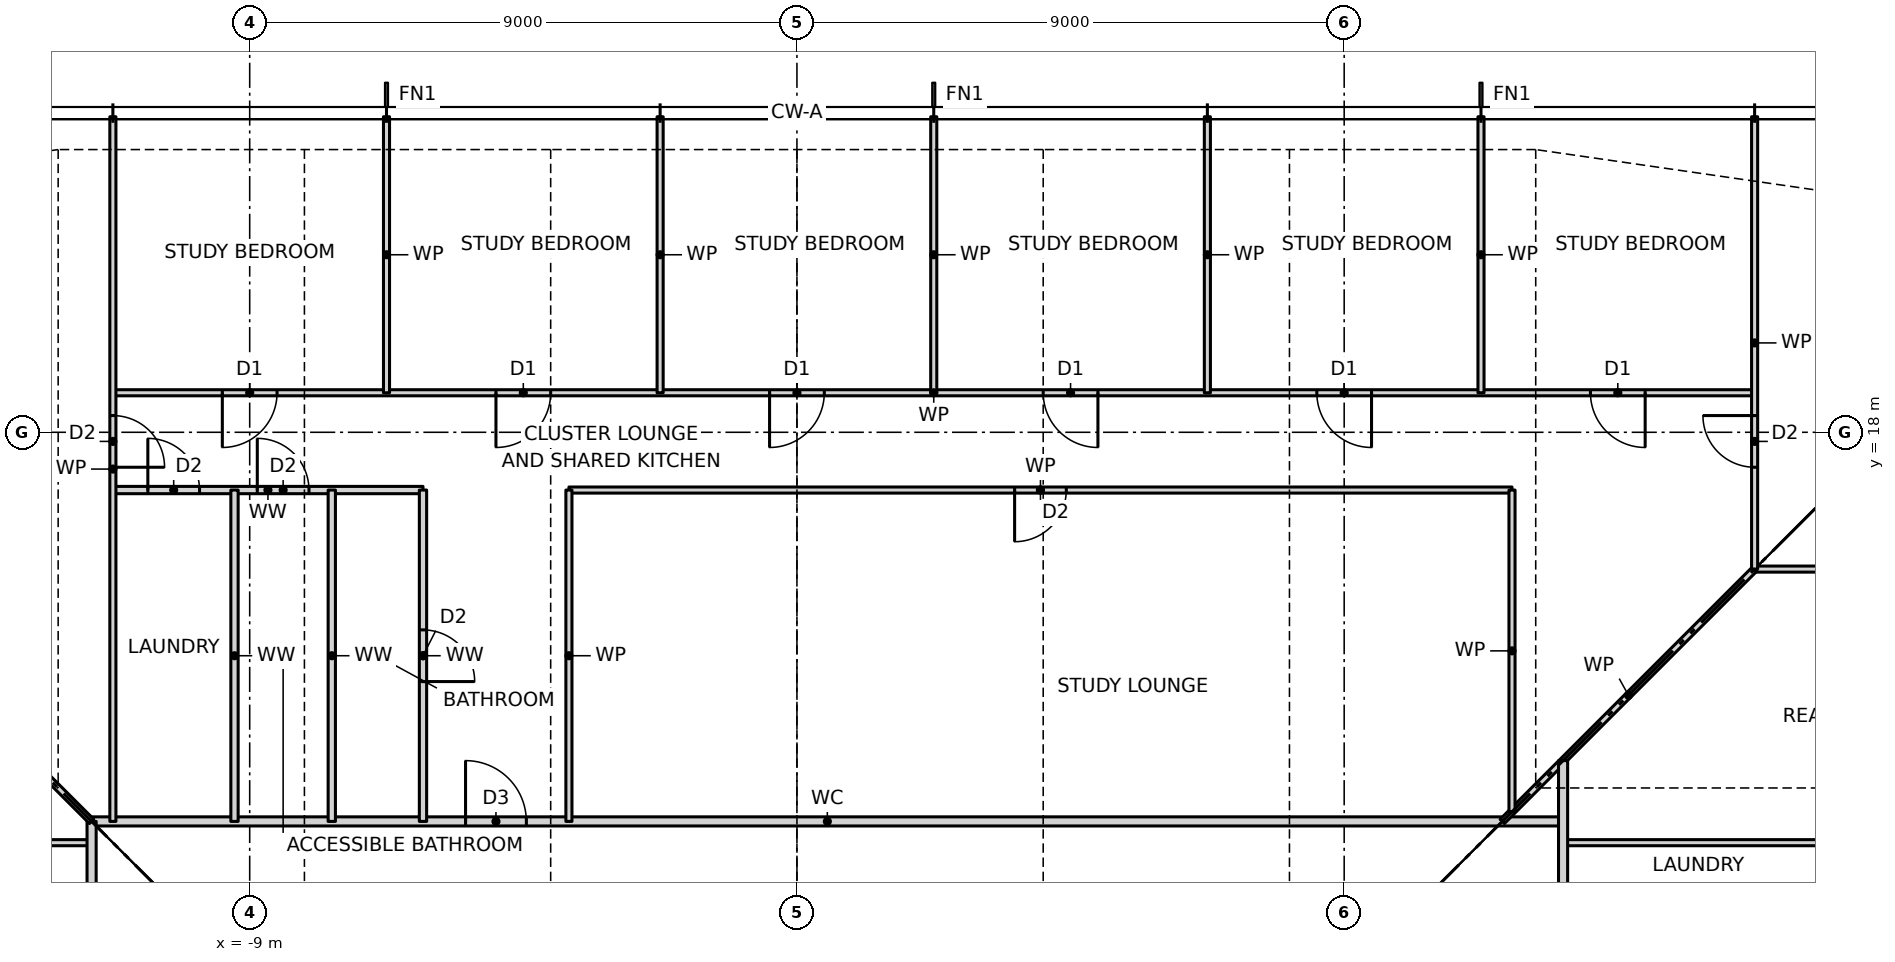
"""IFC4 building model, lengths in metres.
Left out: names, types, materials, properties, quantities, classifications, styles, units other than length and angle.
Written with IfcOpenShell. Run it as: python <this file> out.ifc"""

import sys

from ifc_helpers import new_model, si_unit, direction, frame, frame_2d, origin, place, context, subcontext, project, spatial, rectangle, extrude, element, fill, save


model = new_model("IFC4")
c1 = context("Model", 3, precision=1e-05, world=origin(), true_north=direction((0.0, 1.0)))
c2 = subcontext(c1, "Body", "Model", "MODEL_VIEW")
j1 = project(units=[si_unit("LENGTHUNIT", "METRE"), si_unit("PLANEANGLEUNIT", "RADIAN")], contexts=[c1])
p1 = place(None, origin())
s1 = spatial("IfcSite", under=j1, at=p1, CompositionType="ELEMENT")
p2 = place(p1, origin())
s2 = spatial("IfcBuilding", under=s1, at=p2, CompositionType="ELEMENT")
p3 = place(p2, frame((0.0, 0.0, 71.0)))
s3 = spatial("IfcBuildingStorey", under=s2, at=p3, CompositionType="ELEMENT", Elevation=71.0)
p4 = place(p3, frame((-23.19, 11.25, 0.0), z_axis=(0.0, 0.0, 1.0), x_axis=(1.0, 0.0, 0.0)))
e1 = element("IfcWall", 1, at=p4, inside=s3, PredefinedType="PARTITIONING", context=c2, shape_type="SweptSolid", body=[
    extrude(rectangle(XDim=11.59, YDim=0.1, at=frame_2d((5.795, 0.0))), origin(), (0.0, 0.0, 1.0), 3.2),
])
p5 = place(p4, frame((7.965, 0.0, 0.0)))
e2 = element("IfcOpeningElement", 2, at=p5, cuts=e1, PredefinedType="OPENING", context=c2, shape_type="SweptSolid", body=[
    extrude(rectangle(XDim=1.8, YDim=2.1, at=frame_2d((0.9, 1.05))), frame((0.0, 0.06, 0.0), z_axis=(0.0, -1.0, 0.0), x_axis=(1.0, 0.0, 0.0)), (0.0, 0.0, 1.0), 0.12),
])
p6 = place(p3, frame((12.6, 11.25, 0.0), z_axis=(0.0, 0.0, 1.0), x_axis=(1.0, 0.0, 0.0)))
e3 = element("IfcWall", 3, at=p6, inside=s3, PredefinedType="PARTITIONING", context=c2, shape_type="SweptSolid", body=[
    extrude(rectangle(XDim=10.59, YDim=0.1, at=frame_2d((5.295, 0.0))), origin(), (0.0, 0.0, 1.0), 3.2),
])
p7 = place(p6, frame((4.825, 0.0, 0.0)))
e4 = element("IfcOpeningElement", 4, at=p7, cuts=e3, PredefinedType="OPENING", context=c2, shape_type="SweptSolid", body=[
    extrude(rectangle(XDim=0.85, YDim=2.1, at=frame_2d((0.425, 1.05))), frame((0.0, 0.06, 0.0), z_axis=(0.0, -1.0, 0.0), x_axis=(1.0, 0.0, 0.0)), (0.0, 0.0, 1.0), 0.12),
])
p8 = place(p3, frame((-11.6, 11.6, 0.0), z_axis=(0.0, 0.0, 1.0), x_axis=(1.0, 0.0, 0.0)))
e5 = element("IfcWall", 5, at=p8, inside=s3, PredefinedType="PARTITIONING", context=c2, shape_type="SweptSolid", body=[
    extrude(rectangle(XDim=24.2, YDim=0.15, at=frame_2d((12.1, 0.0))), origin(), (0.0, 0.0, 1.0), 3.2),
])
p9 = place(p8, frame((6.15, 0.0, 0.0)))
e6 = element("IfcOpeningElement", 6, at=p9, cuts=e5, PredefinedType="OPENING", context=c2, shape_type="SweptSolid", body=[
    extrude(rectangle(XDim=1.0, YDim=2.1, at=frame_2d((0.5, 1.05))), frame((0.0, 0.085, 0.0), z_axis=(0.0, -1.0, 0.0), x_axis=(1.0, 0.0, 0.0)), (0.0, 0.0, 1.0), 0.17),
])
p10 = place(p3, frame((15.75, 15.75, 0.0), z_axis=(0.0, 0.0, 1.0), x_axis=(1.0, 0.0, 0.0)))
e7 = element("IfcWall", 7, at=p10, inside=s3, PredefinedType="PARTITIONING", context=c2, shape_type="SweptSolid", body=[
    extrude(rectangle(XDim=7.44, YDim=0.1, at=frame_2d((3.72, 0.0))), origin(), (0.0, 0.0, 1.0), 3.2),
])
p11 = place(p3, frame((-11.25, 17.05, 0.0), z_axis=(0.0, 0.0, 1.0), x_axis=(1.0, 0.0, 0.0)))
e8 = element("IfcWall", 8, at=p11, inside=s3, PredefinedType="PARTITIONING", context=c2, shape_type="SweptSolid", body=[
    extrude(rectangle(XDim=5.1, YDim=0.12, at=frame_2d((2.55, 0.0))), origin(), (0.0, 0.0, 1.0), 3.2),
])
p12 = place(p11, frame((2.375, 0.0, 0.0)))
e9 = element("IfcOpeningElement", 9, at=p12, cuts=e8, PredefinedType="OPENING", context=c2, shape_type="SweptSolid", body=[
    extrude(rectangle(XDim=0.85, YDim=2.1, at=frame_2d((0.425, 1.05))), frame((0.0, 0.07, 0.0), z_axis=(0.0, -1.0, 0.0), x_axis=(1.0, 0.0, 0.0)), (0.0, 0.0, 1.0), 0.14),
])
p13 = place(p11, frame((0.575, 0.0, 0.0)))
e10 = element("IfcOpeningElement", 10, at=p13, cuts=e8, PredefinedType="OPENING", context=c2, shape_type="SweptSolid", body=[
    extrude(rectangle(XDim=0.85, YDim=2.1, at=frame_2d((0.425, 1.05))), frame((0.0, 0.07, 0.0), z_axis=(0.0, -1.0, 0.0), x_axis=(1.0, 0.0, 0.0)), (0.0, 0.0, 1.0), 0.14),
])
p14 = place(p3, frame((-3.75, 17.05, 0.0), z_axis=(0.0, 0.0, 1.0), x_axis=(1.0, 0.0, 0.0)))
e11 = element("IfcWall", 11, at=p14, inside=s3, PredefinedType="PARTITIONING", context=c2, shape_type="SweptSolid", body=[
    extrude(rectangle(XDim=15.51, YDim=0.1, at=frame_2d((7.755, 0.0))), origin(), (0.0, 0.0, 1.0), 3.2),
])
p15 = place(p14, frame((7.33, 0.0, 0.0)))
e12 = element("IfcOpeningElement", 12, at=p15, cuts=e11, PredefinedType="OPENING", context=c2, shape_type="SweptSolid", body=[
    extrude(rectangle(XDim=0.85, YDim=2.1, at=frame_2d((0.425, 1.05))), frame((0.0, 0.06, 0.0), z_axis=(0.0, -1.0, 0.0), x_axis=(1.0, 0.0, 0.0)), (0.0, 0.0, 1.0), 0.12),
])
p16 = place(p3, frame((-11.25, 18.65, 0.0), z_axis=(0.0, 0.0, 1.0), x_axis=(1.0, 0.0, 0.0)))
e13 = element("IfcWall", 13, at=p16, inside=s3, PredefinedType="PARTITIONING", context=c2, shape_type="SweptSolid", body=[
    extrude(rectangle(XDim=27.0, YDim=0.1, at=frame_2d((13.5, 0.0))), origin(), (0.0, 0.0, 1.0), 3.2),
])
p17 = place(p16, frame((24.3, 0.0, 0.0)))
e14 = element("IfcOpeningElement", 14, at=p17, cuts=e13, PredefinedType="OPENING", context=c2, shape_type="SweptSolid", body=[
    extrude(rectangle(XDim=0.9, YDim=2.1, at=frame_2d((0.45, 1.05))), frame((0.0, 0.06, 0.0), z_axis=(0.0, -1.0, 0.0), x_axis=(1.0, 0.0, 0.0)), (0.0, 0.0, 1.0), 0.12),
])
p18 = place(p16, frame((19.8, 0.0, 0.0)))
e15 = element("IfcOpeningElement", 15, at=p18, cuts=e13, PredefinedType="OPENING", context=c2, shape_type="SweptSolid", body=[
    extrude(rectangle(XDim=0.9, YDim=2.1, at=frame_2d((0.45, 1.05))), frame((0.0, 0.06, 0.0), z_axis=(0.0, -1.0, 0.0), x_axis=(1.0, 0.0, 0.0)), (0.0, 0.0, 1.0), 0.12),
])
p19 = place(p16, frame((15.3, 0.0, 0.0)))
e16 = element("IfcOpeningElement", 16, at=p19, cuts=e13, PredefinedType="OPENING", context=c2, shape_type="SweptSolid", body=[
    extrude(rectangle(XDim=0.9, YDim=2.1, at=frame_2d((0.45, 1.05))), frame((0.0, 0.06, 0.0), z_axis=(0.0, -1.0, 0.0), x_axis=(1.0, 0.0, 0.0)), (0.0, 0.0, 1.0), 0.12),
])
p20 = place(p16, frame((10.8, 0.0, 0.0)))
e17 = element("IfcOpeningElement", 17, at=p20, cuts=e13, PredefinedType="OPENING", context=c2, shape_type="SweptSolid", body=[
    extrude(rectangle(XDim=0.9, YDim=2.1, at=frame_2d((0.45, 1.05))), frame((0.0, 0.06, 0.0), z_axis=(0.0, -1.0, 0.0), x_axis=(1.0, 0.0, 0.0)), (0.0, 0.0, 1.0), 0.12),
])
p21 = place(p16, frame((6.3, 0.0, 0.0)))
e18 = element("IfcOpeningElement", 18, at=p21, cuts=e13, PredefinedType="OPENING", context=c2, shape_type="SweptSolid", body=[
    extrude(rectangle(XDim=0.9, YDim=2.1, at=frame_2d((0.45, 1.05))), frame((0.0, 0.06, 0.0), z_axis=(0.0, -1.0, 0.0), x_axis=(1.0, 0.0, 0.0)), (0.0, 0.0, 1.0), 0.12),
])
p22 = place(p16, frame((1.8, 0.0, 0.0)))
e19 = element("IfcOpeningElement", 19, at=p22, cuts=e13, PredefinedType="OPENING", context=c2, shape_type="SweptSolid", body=[
    extrude(rectangle(XDim=0.9, YDim=2.1, at=frame_2d((0.45, 1.05))), frame((0.0, 0.06, 0.0), z_axis=(0.0, -1.0, 0.0), x_axis=(1.0, 0.0, 0.0)), (0.0, 0.0, 1.0), 0.12),
])
p23 = place(p3, frame((11.6, 11.6, 0.0), z_axis=(0.0, 0.0, 1.0), x_axis=(0.707106781187, 0.707106781187, 0.0)))
e20 = element("IfcWall", 20, at=p23, inside=s3, PredefinedType="PARTITIONING", context=c2, shape_type="SweptSolid", body=[
    extrude(rectangle(XDim=5.869, YDim=0.1, at=frame_2d((2.935, 0.0))), origin(), (0.0, 0.0, 1.0), 3.2),
])
p24 = place(p3, frame((15.75, 15.75, 0.0), z_axis=(0.0, 0.0, 1.0), x_axis=(0.0, 1.0, 0.0)))
e21 = element("IfcWall", 21, at=p24, inside=s3, PredefinedType="PARTITIONING", context=c2, shape_type="SweptSolid", body=[
    extrude(rectangle(XDim=7.44, YDim=0.1, at=frame_2d((3.72, 0.0))), origin(), (0.0, 0.0, 1.0), 3.2),
])
p25 = place(p24, frame((1.675, 0.0, 0.0)))
e22 = element("IfcOpeningElement", 22, at=p25, cuts=e21, PredefinedType="OPENING", context=c2, shape_type="SweptSolid", body=[
    extrude(rectangle(XDim=0.85, YDim=2.1, at=frame_2d((0.425, 1.05))), frame((0.0, 0.06, 0.0), z_axis=(0.0, -1.0, 0.0), x_axis=(1.0, 0.0, 0.0)), (0.0, 0.0, 1.0), 0.12),
])
p26 = place(p3, frame((12.6, -12.6, 0.0), z_axis=(0.0, 0.0, 1.0), x_axis=(0.0, 1.0, 0.0)))
e23 = element("IfcWall", 23, at=p26, inside=s3, PredefinedType="PARTITIONING", context=c2, shape_type="SweptSolid", body=[
    extrude(rectangle(XDim=25.2, YDim=0.15, at=frame_2d((12.6, 0.0))), origin(), (0.0, 0.0, 1.0), 3.2),
])
p27 = place(p26, frame((17.05, 0.0, 0.0)))
e24 = element("IfcOpeningElement", 24, at=p27, cuts=e23, PredefinedType="OPENING", context=c2, shape_type="SweptSolid", body=[
    extrude(rectangle(XDim=1.0, YDim=2.1, at=frame_2d((0.5, 1.05))), frame((0.0, 0.085, 0.0), z_axis=(0.0, -1.0, 0.0), x_axis=(1.0, 0.0, 0.0)), (0.0, 0.0, 1.0), 0.17),
])
p28 = place(p3, frame((11.76, 11.76, 0.0), z_axis=(0.0, 0.0, 1.0), x_axis=(0.0, 1.0, 0.0)))
e25 = element("IfcWall", 25, at=p28, inside=s3, PredefinedType="PARTITIONING", context=c2, shape_type="SweptSolid", body=[
    extrude(rectangle(XDim=5.29, YDim=0.1, at=frame_2d((2.645, 0.0))), origin(), (0.0, 0.0, 1.0), 3.2),
])
for number, where, z_axis, x_axis in (
    (26, (11.25, 18.65, 0.0), (0.0, 0.0, 1.0), (0.0, 1.0, 0.0)),
    (27, (6.75, 18.65, 0.0), (0.0, 0.0, 1.0), (0.0, 1.0, 0.0)),
    (28, (2.25, 18.65, 0.0), (0.0, 0.0, 1.0), (0.0, 1.0, 0.0)),
    (29, (-2.25, 18.65, 0.0), (0.0, 0.0, 1.0), (0.0, 1.0, 0.0)),
):
    element("IfcWall", number, at=place(p3, frame(where, z_axis=z_axis, x_axis=x_axis)), inside=s3, PredefinedType="PARTITIONING", context=c2, shape_type="SweptSolid", body=[
        extrude(rectangle(XDim=4.54, YDim=0.1, at=frame_2d((2.27, 0.0))), origin(), (0.0, 0.0, 1.0), 3.2),
    ])
p29 = place(p3, frame((-3.75, 11.6, 0.0), z_axis=(0.0, 0.0, 1.0), x_axis=(0.0, 1.0, 0.0)))
e30 = element("IfcWall", 30, at=p29, inside=s3, PredefinedType="PARTITIONING", context=c2, shape_type="SweptSolid", body=[
    extrude(rectangle(XDim=5.45, YDim=0.1, at=frame_2d((2.725, 0.0))), origin(), (0.0, 0.0, 1.0), 3.2),
])
p30 = place(p3, frame((-6.15, 11.6, 0.0), z_axis=(0.0, 0.0, 1.0), x_axis=(0.0, 1.0, 0.0)))
e31 = element("IfcWall", 31, at=p30, inside=s3, PredefinedType="PARTITIONING", context=c2, shape_type="SweptSolid", body=[
    extrude(rectangle(XDim=5.45, YDim=0.12, at=frame_2d((2.725, 0.0))), origin(), (0.0, 0.0, 1.0), 3.2),
])
p31 = place(p30, frame((2.3, 0.0, 0.0)))
e32 = element("IfcOpeningElement", 32, at=p31, cuts=e31, PredefinedType="OPENING", context=c2, shape_type="SweptSolid", body=[
    extrude(rectangle(XDim=0.85, YDim=2.1, at=frame_2d((0.425, 1.05))), frame((0.0, 0.07, 0.0), z_axis=(0.0, -1.0, 0.0), x_axis=(1.0, 0.0, 0.0)), (0.0, 0.0, 1.0), 0.14),
])
p32 = place(p3, frame((-6.75, 18.65, 0.0), z_axis=(0.0, 0.0, 1.0), x_axis=(0.0, 1.0, 0.0)))
e33 = element("IfcWall", 33, at=p32, inside=s3, PredefinedType="PARTITIONING", context=c2, shape_type="SweptSolid", body=[
    extrude(rectangle(XDim=4.54, YDim=0.1, at=frame_2d((2.27, 0.0))), origin(), (0.0, 0.0, 1.0), 3.2),
])
for number, where, z_axis, x_axis in (
    (34, (-7.65, 11.6, 0.0), (0.0, 0.0, 1.0), (0.0, 1.0, 0.0)),
    (35, (-9.25, 11.6, 0.0), (0.0, 0.0, 1.0), (0.0, 1.0, 0.0)),
):
    element("IfcWall", number, at=place(p3, frame(where, z_axis=z_axis, x_axis=x_axis)), inside=s3, PredefinedType="PARTITIONING", context=c2, shape_type="SweptSolid", body=[
        extrude(rectangle(XDim=5.45, YDim=0.12, at=frame_2d((2.725, 0.0))), origin(), (0.0, 0.0, 1.0), 3.2),
    ])
p33 = place(p3, frame((-11.25, 11.6, 0.0), z_axis=(0.0, 0.0, 1.0), x_axis=(0.0, 1.0, 0.0)))
e36 = element("IfcWall", 36, at=p33, inside=s3, PredefinedType="PARTITIONING", context=c2, shape_type="SweptSolid", body=[
    extrude(rectangle(XDim=11.59, YDim=0.1, at=frame_2d((5.795, 0.0))), origin(), (0.0, 0.0, 1.0), 3.2),
])
p34 = place(p33, frame((5.825, 0.0, 0.0)))
e37 = element("IfcOpeningElement", 37, at=p34, cuts=e36, PredefinedType="OPENING", context=c2, shape_type="SweptSolid", body=[
    extrude(rectangle(XDim=0.85, YDim=2.1, at=frame_2d((0.425, 1.05))), frame((0.0, 0.06, 0.0), z_axis=(0.0, -1.0, 0.0), x_axis=(1.0, 0.0, 0.0)), (0.0, 0.0, 1.0), 0.12),
])
p35 = place(p3, frame((-11.6, -11.6, 0.0), z_axis=(0.0, 0.0, 1.0), x_axis=(0.0, 1.0, 0.0)))
e38 = element("IfcWall", 38, at=p35, inside=s3, PredefinedType="PARTITIONING", context=c2, shape_type="SweptSolid", body=[
    extrude(rectangle(XDim=23.2, YDim=0.15, at=frame_2d((11.6, 0.0))), origin(), (0.0, 0.0, 1.0), 3.2),
])
p36 = place(p35, frame((18.6, 0.0, 0.0)))
e39 = element("IfcOpeningElement", 39, at=p36, cuts=e38, PredefinedType="OPENING", context=c2, shape_type="SweptSolid", body=[
    extrude(rectangle(XDim=1.0, YDim=2.1, at=frame_2d((0.5, 1.05))), frame((0.0, 0.085, 0.0), z_axis=(0.0, -1.0, 0.0), x_axis=(1.0, 0.0, 0.0)), (0.0, 0.0, 1.0), 0.17),
])
p37 = place(p35, frame((1.175, 0.0, 0.0)))
e40 = element("IfcOpeningElement", 40, at=p37, cuts=e38, PredefinedType="OPENING", context=c2, shape_type="SweptSolid", body=[
    extrude(rectangle(XDim=1.0, YDim=2.1, at=frame_2d((0.5, 1.05))), frame((0.0, 0.085, 0.0), z_axis=(0.0, -1.0, 0.0), x_axis=(1.0, 0.0, 0.0)), (0.0, 0.0, 1.0), 0.17),
])
p38 = place(p3, frame((-11.6, 11.6, 0.0), z_axis=(0.0, 0.0, 1.0), x_axis=(-0.707106781187, 0.707106781187, 0.0)))
e41 = element("IfcWall", 41, at=p38, inside=s3, PredefinedType="PARTITIONING", context=c2, shape_type="SweptSolid", body=[
    extrude(rectangle(XDim=5.869, YDim=0.1, at=frame_2d((2.935, 0.0))), origin(), (0.0, 0.0, 1.0), 3.2),
])
p39 = place(p17, frame((0.9, 0.0, 0.0), z_axis=(0.0, 0.0, 1.0), x_axis=(-1.0, 0.0, 0.0)))
e42 = element("IfcDoor", 42, at=p39, inside=s3, OperationType="SINGLE_SWING_LEFT", PredefinedType="DOOR", context=c2, shape_type="SweptSolid", body=[
    extrude(rectangle(XDim=0.9, YDim=2.1, at=frame_2d((0.45, 1.05))), frame((0.0, 0.025, 0.0), z_axis=(0.0, -1.0, 0.0), x_axis=(1.0, 0.0, 0.0)), (0.0, 0.0, 1.0), 0.05),
])
fill(e14, e42)
p40 = place(p18, frame((0.9, 0.0, 0.0), z_axis=(0.0, 0.0, 1.0), x_axis=(-1.0, 0.0, 0.0)))
e43 = element("IfcDoor", 43, at=p40, inside=s3, OperationType="SINGLE_SWING_LEFT", PredefinedType="DOOR", context=c2, shape_type="SweptSolid", body=[
    extrude(rectangle(XDim=0.9, YDim=2.1, at=frame_2d((0.45, 1.05))), frame((0.0, 0.025, 0.0), z_axis=(0.0, -1.0, 0.0), x_axis=(1.0, 0.0, 0.0)), (0.0, 0.0, 1.0), 0.05),
])
fill(e15, e43)
p41 = place(p19, frame((0.9, 0.0, 0.0), z_axis=(0.0, 0.0, 1.0), x_axis=(-1.0, 0.0, 0.0)))
e44 = element("IfcDoor", 44, at=p41, inside=s3, OperationType="SINGLE_SWING_LEFT", PredefinedType="DOOR", context=c2, shape_type="SweptSolid", body=[
    extrude(rectangle(XDim=0.9, YDim=2.1, at=frame_2d((0.45, 1.05))), frame((0.0, 0.025, 0.0), z_axis=(0.0, -1.0, 0.0), x_axis=(1.0, 0.0, 0.0)), (0.0, 0.0, 1.0), 0.05),
])
fill(e16, e44)
p42 = place(p20, frame((0.9, 0.0, 0.0), z_axis=(0.0, 0.0, 1.0), x_axis=(-1.0, 0.0, 0.0)))
e45 = element("IfcDoor", 45, at=p42, inside=s3, OperationType="SINGLE_SWING_RIGHT", PredefinedType="DOOR", context=c2, shape_type="SweptSolid", body=[
    extrude(rectangle(XDim=0.9, YDim=2.1, at=frame_2d((0.45, 1.05))), frame((0.0, 0.025, 0.0), z_axis=(0.0, -1.0, 0.0), x_axis=(1.0, 0.0, 0.0)), (0.0, 0.0, 1.0), 0.05),
])
fill(e17, e45)
p43 = place(p21, frame((0.9, 0.0, 0.0), z_axis=(0.0, 0.0, 1.0), x_axis=(-1.0, 0.0, 0.0)))
e46 = element("IfcDoor", 46, at=p43, inside=s3, OperationType="SINGLE_SWING_RIGHT", PredefinedType="DOOR", context=c2, shape_type="SweptSolid", body=[
    extrude(rectangle(XDim=0.9, YDim=2.1, at=frame_2d((0.45, 1.05))), frame((0.0, 0.025, 0.0), z_axis=(0.0, -1.0, 0.0), x_axis=(1.0, 0.0, 0.0)), (0.0, 0.0, 1.0), 0.05),
])
fill(e18, e46)
p44 = place(p22, frame((0.9, 0.0, 0.0), z_axis=(0.0, 0.0, 1.0), x_axis=(-1.0, 0.0, 0.0)))
e47 = element("IfcDoor", 47, at=p44, inside=s3, OperationType="SINGLE_SWING_RIGHT", PredefinedType="DOOR", context=c2, shape_type="SweptSolid", body=[
    extrude(rectangle(XDim=0.9, YDim=2.1, at=frame_2d((0.45, 1.05))), frame((0.0, 0.025, 0.0), z_axis=(0.0, -1.0, 0.0), x_axis=(1.0, 0.0, 0.0)), (0.0, 0.0, 1.0), 0.05),
])
fill(e19, e47)
p45 = place(p9, origin())
e48 = element("IfcDoor", 48, at=p45, inside=s3, OperationType="SINGLE_SWING_LEFT", PredefinedType="DOOR", context=c2, shape_type="SweptSolid", body=[
    extrude(rectangle(XDim=1.0, YDim=2.1, at=frame_2d((0.5, 1.05))), frame((0.0, 0.025, 0.0), z_axis=(0.0, -1.0, 0.0), x_axis=(1.0, 0.0, 0.0)), (0.0, 0.0, 1.0), 0.05),
])
fill(e6, e48)
p46 = place(p15, frame((0.85, 0.0, 0.0), z_axis=(0.0, 0.0, 1.0), x_axis=(-1.0, 0.0, 0.0)))
e49 = element("IfcDoor", 49, at=p46, inside=s3, OperationType="SINGLE_SWING_RIGHT", PredefinedType="DOOR", context=c2, shape_type="SweptSolid", body=[
    extrude(rectangle(XDim=0.85, YDim=2.1, at=frame_2d((0.425, 1.05))), frame((0.0, 0.025, 0.0), z_axis=(0.0, -1.0, 0.0), x_axis=(1.0, 0.0, 0.0)), (0.0, 0.0, 1.0), 0.05),
])
fill(e12, e49)
p47 = place(p31, frame((0.85, 0.0, 0.0), z_axis=(0.0, 0.0, 1.0), x_axis=(-1.0, 0.0, 0.0)))
e50 = element("IfcDoor", 50, at=p47, inside=s3, OperationType="SINGLE_SWING_RIGHT", PredefinedType="DOOR", context=c2, shape_type="SweptSolid", body=[
    extrude(rectangle(XDim=0.85, YDim=2.1, at=frame_2d((0.425, 1.05))), frame((0.0, 0.025, 0.0), z_axis=(0.0, -1.0, 0.0), x_axis=(1.0, 0.0, 0.0)), (0.0, 0.0, 1.0), 0.05),
])
fill(e32, e50)
p48 = place(p12, origin())
e51 = element("IfcDoor", 51, at=p48, inside=s3, OperationType="SINGLE_SWING_LEFT", PredefinedType="DOOR", context=c2, shape_type="SweptSolid", body=[
    extrude(rectangle(XDim=0.85, YDim=2.1, at=frame_2d((0.425, 1.05))), frame((0.0, 0.025, 0.0), z_axis=(0.0, -1.0, 0.0), x_axis=(1.0, 0.0, 0.0)), (0.0, 0.0, 1.0), 0.05),
])
fill(e9, e51)
p49 = place(p13, origin())
e52 = element("IfcDoor", 52, at=p49, inside=s3, OperationType="SINGLE_SWING_LEFT", PredefinedType="DOOR", context=c2, shape_type="SweptSolid", body=[
    extrude(rectangle(XDim=0.85, YDim=2.1, at=frame_2d((0.425, 1.05))), frame((0.0, 0.025, 0.0), z_axis=(0.0, -1.0, 0.0), x_axis=(1.0, 0.0, 0.0)), (0.0, 0.0, 1.0), 0.05),
])
fill(e10, e52)
p50 = place(p34, frame((0.85, 0.0, 0.0), z_axis=(0.0, 0.0, 1.0), x_axis=(-1.0, 0.0, 0.0)))
e53 = element("IfcDoor", 53, at=p50, inside=s3, OperationType="SINGLE_SWING_RIGHT", PredefinedType="DOOR", context=c2, shape_type="SweptSolid", body=[
    extrude(rectangle(XDim=0.85, YDim=2.1, at=frame_2d((0.425, 1.05))), frame((0.0, 0.025, 0.0), z_axis=(0.0, -1.0, 0.0), x_axis=(1.0, 0.0, 0.0)), (0.0, 0.0, 1.0), 0.05),
])
fill(e37, e53)
p51 = place(p25, origin())
e54 = element("IfcDoor", 54, at=p51, inside=s3, OperationType="SINGLE_SWING_RIGHT", PredefinedType="DOOR", context=c2, shape_type="SweptSolid", body=[
    extrude(rectangle(XDim=0.85, YDim=2.1, at=frame_2d((0.425, 1.05))), frame((0.0, 0.025, 0.0), z_axis=(0.0, -1.0, 0.0), x_axis=(1.0, 0.0, 0.0)), (0.0, 0.0, 1.0), 0.05),
])
fill(e22, e54)
save(model, sys.argv[1])
